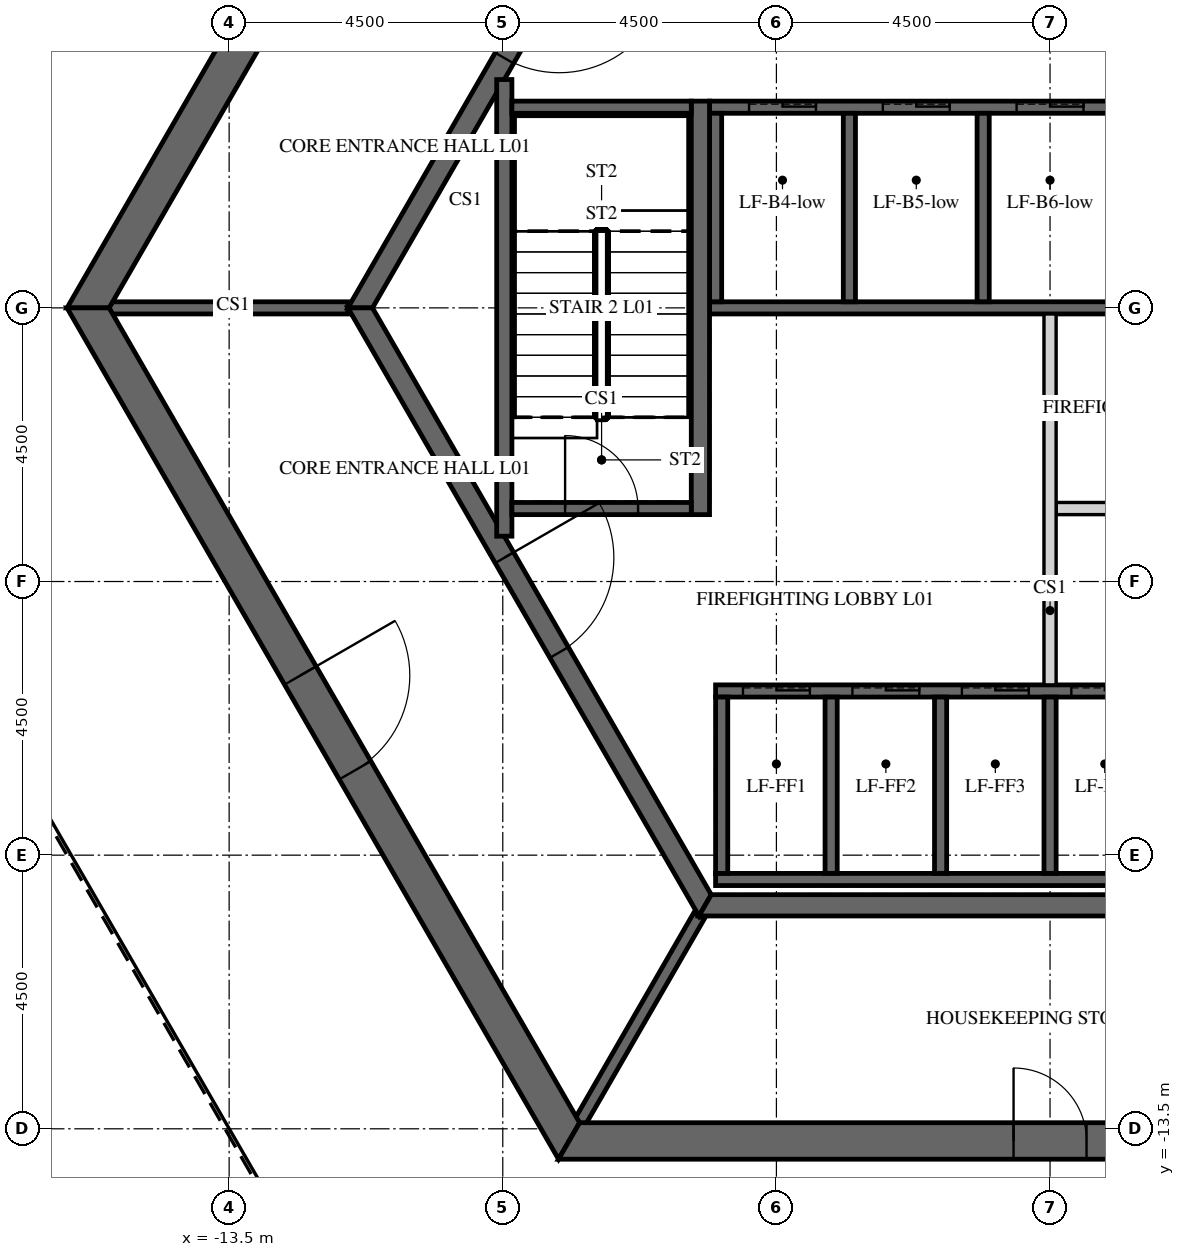
"""IFC4 building model, lengths in metres.
Left out: names, types, materials, properties, quantities, classifications, styles, units other than length and angle.
Written with IfcOpenShell. Run it as: python <this file> out.ifc"""

import sys

from ifc_helpers import new_model, si_unit, direction, frame, frame_2d, origin, place, context, subcontext, project, spatial, polyline, rectangle, outline, extrude, element, fill, save


model = new_model("IFC4")
c1 = context("Model", 3, precision=1e-05, world=origin(), true_north=direction((0.0, 1.0)))
c2 = subcontext(c1, "Body", "Model", "MODEL_VIEW")
j1 = project(units=[si_unit("LENGTHUNIT", "METRE"), si_unit("PLANEANGLEUNIT", "RADIAN")], contexts=[c1])
p1 = place(None, origin())
s1 = spatial("IfcSite", under=j1, at=p1, CompositionType="ELEMENT")
p2 = place(p1, origin())
s2 = spatial("IfcBuilding", under=s1, at=p2, CompositionType="ELEMENT")
p3 = place(p2, frame((0.0, 0.0, 9.0)))
s3 = spatial("IfcBuildingStorey", under=s2, at=p3, CompositionType="ELEMENT", Elevation=9.0)
p4 = place(p3, frame((-7.91, 13.7, -0.25), z_axis=(0.0, 0.0, 1.0), x_axis=(-0.499999880136, -0.866025472988, 0.0)))
e1 = element("IfcWall", 1, at=p4, inside=s3, PredefinedType="SHEAR", context=c2, shape_type="SweptSolid", body=[
    extrude(outline(polyline([(-0.173, -0.3), (15.993, -0.3), (15.646, 0.3), (0.173, 0.3), (-0.173, -0.3)])), origin(), (0.0, 0.0, 1.0), 6.0),
])
p5 = place(p4, frame((7.039, 0.0, 0.25)))
e2 = element("IfcOpeningElement", 2, at=p5, cuts=e1, PredefinedType="OPENING", context=c2, shape_type="SweptSolid", body=[
    extrude(rectangle(XDim=1.8, YDim=2.4, at=frame_2d((0.9, 1.2))), frame((0.0, 0.31, 0.0), z_axis=(0.0, -1.0, 0.0), x_axis=(1.0, 0.0, 0.0)), (0.0, 0.0, 1.0), 0.62),
])
p6 = place(p3, frame((-15.819, 0.0, -0.25), z_axis=(0.0, 0.0, 1.0), x_axis=(0.499999880136, -0.866025472988, 0.0)))
e3 = element("IfcWall", 3, at=p6, inside=s3, PredefinedType="SHEAR", context=c2, shape_type="SweptSolid", body=[
    extrude(outline(polyline([(-0.173, -0.3), (15.993, -0.3), (15.646, 0.3), (0.173, 0.3), (-0.173, -0.3)])), origin(), (0.0, 0.0, 1.0), 6.0),
])
p7 = place(p6, frame((6.981, 0.0, 0.25)))
e4 = element("IfcOpeningElement", 4, at=p7, cuts=e3, PredefinedType="OPENING", context=c2, shape_type="SweptSolid", body=[
    extrude(rectangle(XDim=1.8, YDim=2.4, at=frame_2d((0.9, 1.2))), frame((0.0, 0.31, 0.0), z_axis=(0.0, -1.0, 0.0), x_axis=(1.0, 0.0, 0.0)), (0.0, 0.0, 1.0), 0.62),
])
p8 = place(p3, frame((-7.91, -13.7, -0.25), z_axis=(0.0, 0.0, 1.0), x_axis=(1.0, 0.0, 0.0)))
e5 = element("IfcWall", 5, at=p8, inside=s3, PredefinedType="SHEAR", context=c2, shape_type="SweptSolid", body=[
    extrude(outline(polyline([(-0.173, -0.3), (15.993, -0.3), (15.646, 0.3), (0.173, 0.3), (-0.173, -0.3)])), origin(), (0.0, 0.0, 1.0), 6.0),
])
p9 = place(p8, frame((7.31, 0.0, 0.25)))
e6 = element("IfcOpeningElement", 6, at=p9, cuts=e5, PredefinedType="OPENING", context=c2, shape_type="SweptSolid", body=[
    extrude(rectangle(XDim=1.2, YDim=2.4, at=frame_2d((0.6, 1.2))), frame((0.0, 0.31, 0.0), z_axis=(0.0, -1.0, 0.0), x_axis=(1.0, 0.0, 0.0)), (0.0, 0.0, 1.0), 0.62),
])
p10 = place(p3, frame((-5.673, 9.825, -0.25), z_axis=(0.0, 0.0, 1.0), x_axis=(-0.499995046907, -0.866028263435, 0.0)))
e7 = element("IfcWall", 7, at=p10, inside=s3, PredefinedType="SHEAR", context=c2, shape_type="SweptSolid", body=[
    extrude(outline(polyline([(-0.101, -0.175), (11.446, -0.175), (11.244, 0.175), (0.101, 0.175), (-0.101, -0.175)])), origin(), (0.0, 0.0, 1.0), 6.0),
])
p11 = place(p10, frame((4.801, 0.0, 0.25)))
e8 = element("IfcOpeningElement", 8, at=p11, cuts=e7, PredefinedType="OPENING", context=c2, shape_type="SweptSolid", body=[
    extrude(rectangle(XDim=1.8, YDim=2.4, at=frame_2d((0.9, 1.2))), frame((0.0, 0.185, 0.0), z_axis=(0.0, -1.0, 0.0), x_axis=(1.0, 0.0, 0.0)), (0.0, 0.0, 1.0), 0.37),
])
p12 = place(p3, frame((-11.345, 0.0, -0.25), z_axis=(0.0, 0.0, 1.0), x_axis=(0.499995046907, -0.866028263435, 0.0)))
e9 = element("IfcWall", 9, at=p12, inside=s3, PredefinedType="SHEAR", context=c2, shape_type="SweptSolid", body=[
    extrude(outline(polyline([(-0.101, -0.175), (11.446, -0.175), (11.244, 0.175), (0.101, 0.175), (-0.101, -0.175)])), origin(), (0.0, 0.0, 1.0), 6.0),
])
p13 = place(p12, frame((4.744, 0.0, 0.25)))
e10 = element("IfcOpeningElement", 10, at=p13, cuts=e9, PredefinedType="OPENING", context=c2, shape_type="SweptSolid", body=[
    extrude(rectangle(XDim=1.8, YDim=2.4, at=frame_2d((0.9, 1.2))), frame((0.0, 0.185, 0.0), z_axis=(0.0, -1.0, 0.0), x_axis=(1.0, 0.0, 0.0)), (0.0, 0.0, 1.0), 0.37),
])
p14 = place(p3, frame((-5.673, -9.825, -0.25), z_axis=(0.0, 0.0, 1.0), x_axis=(1.0, 0.0, 0.0)))
e11 = element("IfcWall", 11, at=p14, inside=s3, PredefinedType="SHEAR", context=c2, shape_type="SweptSolid", body=[
    extrude(outline(polyline([(-0.101, -0.175), (11.446, -0.175), (11.244, 0.175), (0.101, 0.175), (-0.101, -0.175)])), origin(), (0.0, 0.0, 1.0), 6.0),
])
p15 = place(p3, frame((-5.6, 3.3, -0.25), z_axis=(0.0, 0.0, 1.0), x_axis=(1.0, 0.0, 0.0)))
e12 = element("IfcWall", 12, at=p15, inside=s3, PredefinedType="SHEAR", context=c2, shape_type="SweptSolid", body=[
    extrude(rectangle(XDim=11.2, YDim=0.2, at=frame_2d((5.6, 0.0))), origin(), (0.0, 0.0, 1.0), 6.0),
])
p16 = place(p15, frame((0.65, 0.0, 0.25)))
e13 = element("IfcOpeningElement", 13, at=p16, cuts=e12, PredefinedType="OPENING", context=c2, shape_type="SweptSolid", body=[
    extrude(rectangle(XDim=1.1, YDim=2.1, at=frame_2d((0.55, 1.05))), frame((0.0, 0.11, 0.0), z_axis=(0.0, -1.0, 0.0), x_axis=(1.0, 0.0, 0.0)), (0.0, 0.0, 1.0), 0.22),
])
p17 = place(p15, frame((2.85, 0.0, 0.25)))
e14 = element("IfcOpeningElement", 14, at=p17, cuts=e12, PredefinedType="OPENING", context=c2, shape_type="SweptSolid", body=[
    extrude(rectangle(XDim=1.1, YDim=2.1, at=frame_2d((0.55, 1.05))), frame((0.0, 0.11, 0.0), z_axis=(0.0, -1.0, 0.0), x_axis=(1.0, 0.0, 0.0)), (0.0, 0.0, 1.0), 0.22),
])
p18 = place(p15, frame((5.05, 0.0, 0.25)))
e15 = element("IfcOpeningElement", 15, at=p18, cuts=e12, PredefinedType="OPENING", context=c2, shape_type="SweptSolid", body=[
    extrude(rectangle(XDim=1.1, YDim=2.1, at=frame_2d((0.55, 1.05))), frame((0.0, 0.11, 0.0), z_axis=(0.0, -1.0, 0.0), x_axis=(1.0, 0.0, 0.0)), (0.0, 0.0, 1.0), 0.22),
])
p19 = place(p15, frame((7.25, 0.0, 0.25)))
e16 = element("IfcOpeningElement", 16, at=p19, cuts=e12, PredefinedType="OPENING", context=c2, shape_type="SweptSolid", body=[
    extrude(rectangle(XDim=1.1, YDim=2.1, at=frame_2d((0.55, 1.05))), frame((0.0, 0.11, 0.0), z_axis=(0.0, -1.0, 0.0), x_axis=(1.0, 0.0, 0.0)), (0.0, 0.0, 1.0), 0.22),
])
p20 = place(p15, frame((9.45, 0.0, 0.25)))
e17 = element("IfcOpeningElement", 17, at=p20, cuts=e12, PredefinedType="OPENING", context=c2, shape_type="SweptSolid", body=[
    extrude(rectangle(XDim=1.1, YDim=2.1, at=frame_2d((0.55, 1.05))), frame((0.0, 0.11, 0.0), z_axis=(0.0, -1.0, 0.0), x_axis=(1.0, 0.0, 0.0)), (0.0, 0.0, 1.0), 0.22),
])
p21 = place(p3, frame((-5.6, 0.0, -0.25), z_axis=(0.0, 0.0, 1.0), x_axis=(1.0, 0.0, 0.0)))
e18 = element("IfcWall", 18, at=p21, inside=s3, PredefinedType="SHEAR", context=c2, shape_type="SweptSolid", body=[
    extrude(rectangle(XDim=11.2, YDim=0.2, at=frame_2d((5.6, 0.0))), origin(), (0.0, 0.0, 1.0), 6.0),
])
for number, where, z_axis, x_axis in (
    (19, (-5.5, 0.1, -0.25), (0.0, 0.0, 1.0), (0.0, 1.0, 0.0)),
    (20, (-3.3, 0.1, -0.25), (0.0, 0.0, 1.0), (0.0, 1.0, 0.0)),
    (21, (-1.1, 0.1, -0.25), (0.0, 0.0, 1.0), (0.0, 1.0, 0.0)),
):
    element("IfcWall", number, at=place(p3, frame(where, z_axis=z_axis, x_axis=x_axis)), inside=s3, PredefinedType="SHEAR", context=c2, shape_type="SweptSolid", body=[
        extrude(rectangle(XDim=3.1, YDim=0.2, at=frame_2d((1.55, 0.0))), origin(), (0.0, 0.0, 1.0), 6.0),
    ])
p22 = place(p3, frame((-5.5, -6.3, -0.25), z_axis=(0.0, 0.0, 1.0), x_axis=(1.0, 0.0, 0.0)))
e22 = element("IfcWall", 22, at=p22, inside=s3, PredefinedType="SHEAR", context=c2, shape_type="SweptSolid", body=[
    extrude(rectangle(XDim=9.2, YDim=0.2, at=frame_2d((4.6, 0.0))), origin(), (0.0, 0.0, 1.0), 6.0),
])
p23 = place(p22, frame((0.45, 0.0, 0.25)))
e23 = element("IfcOpeningElement", 23, at=p23, cuts=e22, PredefinedType="OPENING", context=c2, shape_type="SweptSolid", body=[
    extrude(rectangle(XDim=1.1, YDim=2.1, at=frame_2d((0.55, 1.05))), frame((0.0, 0.11, 0.0), z_axis=(0.0, -1.0, 0.0), x_axis=(1.0, 0.0, 0.0)), (0.0, 0.0, 1.0), 0.22),
])
p24 = place(p22, frame((2.25, 0.0, 0.25)))
e24 = element("IfcOpeningElement", 24, at=p24, cuts=e22, PredefinedType="OPENING", context=c2, shape_type="SweptSolid", body=[
    extrude(rectangle(XDim=1.1, YDim=2.1, at=frame_2d((0.55, 1.05))), frame((0.0, 0.11, 0.0), z_axis=(0.0, -1.0, 0.0), x_axis=(1.0, 0.0, 0.0)), (0.0, 0.0, 1.0), 0.22),
])
p25 = place(p22, frame((4.05, 0.0, 0.25)))
e25 = element("IfcOpeningElement", 25, at=p25, cuts=e22, PredefinedType="OPENING", context=c2, shape_type="SweptSolid", body=[
    extrude(rectangle(XDim=1.1, YDim=2.1, at=frame_2d((0.55, 1.05))), frame((0.0, 0.11, 0.0), z_axis=(0.0, -1.0, 0.0), x_axis=(1.0, 0.0, 0.0)), (0.0, 0.0, 1.0), 0.22),
])
p26 = place(p22, frame((5.85, 0.0, 0.25)))
e26 = element("IfcOpeningElement", 26, at=p26, cuts=e22, PredefinedType="OPENING", context=c2, shape_type="SweptSolid", body=[
    extrude(rectangle(XDim=1.1, YDim=2.1, at=frame_2d((0.55, 1.05))), frame((0.0, 0.11, 0.0), z_axis=(0.0, -1.0, 0.0), x_axis=(1.0, 0.0, 0.0)), (0.0, 0.0, 1.0), 0.22),
])
p27 = place(p22, frame((7.65, 0.0, 0.25)))
e27 = element("IfcOpeningElement", 27, at=p27, cuts=e22, PredefinedType="OPENING", context=c2, shape_type="SweptSolid", body=[
    extrude(rectangle(XDim=1.1, YDim=2.1, at=frame_2d((0.55, 1.05))), frame((0.0, 0.11, 0.0), z_axis=(0.0, -1.0, 0.0), x_axis=(1.0, 0.0, 0.0)), (0.0, 0.0, 1.0), 0.22),
])
p28 = place(p3, frame((-5.5, -9.4, -0.25), z_axis=(0.0, 0.0, 1.0), x_axis=(1.0, 0.0, 0.0)))
e28 = element("IfcWall", 28, at=p28, inside=s3, PredefinedType="SHEAR", context=c2, shape_type="SweptSolid", body=[
    extrude(rectangle(XDim=9.2, YDim=0.2, at=frame_2d((4.6, 0.0))), origin(), (0.0, 0.0, 1.0), 6.0),
])
for number, where, z_axis, x_axis in (
    (29, (-5.4, -9.3, -0.25), (0.0, 0.0, 1.0), (0.0, 1.0, 0.0)),
    (30, (-3.6, -9.3, -0.25), (0.0, 0.0, 1.0), (0.0, 1.0, 0.0)),
    (31, (-1.8, -9.3, -0.25), (0.0, 0.0, 1.0), (0.0, 1.0, 0.0)),
    (32, (0.0, -9.3, -0.25), (0.0, 0.0, 1.0), (0.0, 1.0, 0.0)),
):
    element("IfcWall", number, at=place(p3, frame(where, z_axis=z_axis, x_axis=x_axis)), inside=s3, PredefinedType="SHEAR", context=c2, shape_type="SweptSolid", body=[
        extrude(rectangle(XDim=2.9, YDim=0.2, at=frame_2d((1.45, 0.0))), origin(), (0.0, 0.0, 1.0), 6.0),
    ])
p29 = place(p3, frame((0.1, -3.3, 0.0), z_axis=(0.0, 0.0, 1.0), x_axis=(1.0, 0.0, 0.0)))
e33 = element("IfcWall", 33, at=p29, inside=s3, PredefinedType="PARTITIONING", context=c2, shape_type="SweptSolid", body=[
    extrude(rectangle(XDim=5.5, YDim=0.2, at=frame_2d((2.75, 0.0))), origin(), (0.0, 0.0, 1.0), 5.75),
])
p30 = place(p29, frame((2.3, 0.0, 0.0)))
e34 = element("IfcOpeningElement", 34, at=p30, cuts=e33, PredefinedType="OPENING", context=c2, shape_type="SweptSolid", body=[
    extrude(rectangle(XDim=0.9, YDim=2.1, at=frame_2d((0.45, 1.05))), frame((0.0, 0.11, 0.0), z_axis=(0.0, -1.0, 0.0), x_axis=(1.0, 0.0, 0.0)), (0.0, 0.0, 1.0), 0.22),
])
p31 = place(p3, frame((0.0, -6.2, 0.0), z_axis=(0.0, 0.0, 1.0), x_axis=(0.0, 1.0, 0.0)))
e35 = element("IfcWall", 35, at=p31, inside=s3, PredefinedType="PARTITIONING", context=c2, shape_type="SweptSolid", body=[
    extrude(rectangle(XDim=6.1, YDim=0.2, at=frame_2d((3.05, 0.0))), origin(), (0.0, 0.0, 1.0), 5.75),
])
p32 = place(p3, frame((-11.547, 0.0, -0.25), z_axis=(0.0, 0.0, 1.0), x_axis=(-1.0, 0.0, 0.0)))
e36 = element("IfcWall", 36, at=p32, inside=s3, PredefinedType="SHEAR", context=c2, shape_type="SweptSolid", body=[
    extrude(rectangle(XDim=3.926, YDim=0.2, at=frame_2d((1.963, 0.0))), origin(), (0.0, 0.0, 1.0), 6.0),
])
p33 = place(p3, frame((-5.773, -10.0, -0.25), z_axis=(0.0, 0.0, 1.0), x_axis=(-0.500038251005, -0.86600331843, 0.0)))
e37 = element("IfcWall", 37, at=p33, inside=s3, PredefinedType="SHEAR", context=c2, shape_type="SweptSolid", body=[
    extrude(rectangle(XDim=3.926, YDim=0.2, at=frame_2d((1.963, 0.0))), origin(), (0.0, 0.0, 1.0), 6.0),
])
p34 = place(p3, frame((-5.75, -3.4, -0.25), z_axis=(0.0, 0.0, 1.0), x_axis=(0.0, 1.0, 0.0)))
e38 = element("IfcWall", 38, at=p34, inside=s3, PredefinedType="SHEAR", context=c2, shape_type="SweptSolid", body=[
    extrude(rectangle(XDim=6.8, YDim=0.3, at=frame_2d((3.4, 0.0))), origin(), (0.0, 0.0, 1.0), 6.0),
])
p35 = place(p3, frame((-8.975, -3.755, -0.25), z_axis=(0.0, 0.0, 1.0), x_axis=(0.0, 1.0, 0.0)))
e39 = element("IfcWall", 39, at=p35, inside=s3, PredefinedType="SHEAR", context=c2, shape_type="SweptSolid", body=[
    extrude(rectangle(XDim=7.51, YDim=0.25, at=frame_2d((3.755, 0.0))), origin(), (0.0, 0.0, 1.0), 6.0),
])
p36 = place(p3, frame((-8.85, 3.3, -0.25), z_axis=(0.0, 0.0, 1.0), x_axis=(1.0, 0.0, 0.0)))
e40 = element("IfcWall", 40, at=p36, inside=s3, PredefinedType="SHEAR", context=c2, shape_type="SweptSolid", body=[
    extrude(rectangle(XDim=2.95, YDim=0.2, at=frame_2d((1.475, 0.0))), origin(), (0.0, 0.0, 1.0), 6.0),
])
p37 = place(p3, frame((-8.85, -3.3, -0.25), z_axis=(0.0, 0.0, 1.0), x_axis=(1.0, 0.0, 0.0)))
e41 = element("IfcWall", 41, at=p37, inside=s3, PredefinedType="SHEAR", context=c2, shape_type="SweptSolid", body=[
    extrude(rectangle(XDim=2.95, YDim=0.2, at=frame_2d((1.475, 0.0))), origin(), (0.0, 0.0, 1.0), 6.0),
])
p38 = place(p37, frame((0.875, 0.0, 0.25)))
e42 = element("IfcOpeningElement", 42, at=p38, cuts=e41, PredefinedType="OPENING", context=c2, shape_type="SweptSolid", body=[
    extrude(rectangle(XDim=1.2, YDim=2.4, at=frame_2d((0.6, 1.2))), frame((0.0, 0.11, 0.0), z_axis=(0.0, -1.0, 0.0), x_axis=(1.0, 0.0, 0.0)), (0.0, 0.0, 1.0), 0.22),
])
p39 = place(p7, origin())
e43 = element("IfcDoor", 43, at=p39, inside=s3, OperationType="DOUBLE_DOOR_SINGLE_SWING", PredefinedType="DOOR", context=c2, shape_type="SweptSolid", body=[
    extrude(rectangle(XDim=1.8, YDim=2.4, at=frame_2d((0.9, 1.2))), frame((0.0, 0.025, 0.0), z_axis=(0.0, -1.0, 0.0), x_axis=(1.0, 0.0, 0.0)), (0.0, 0.0, 1.0), 0.05),
])
fill(e4, e43)
p40 = place(p9, origin())
e44 = element("IfcDoor", 44, at=p40, inside=s3, OperationType="SINGLE_SWING_LEFT", PredefinedType="DOOR", context=c2, shape_type="SweptSolid", body=[
    extrude(rectangle(XDim=1.2, YDim=2.4, at=frame_2d((0.6, 1.2))), frame((0.0, 0.025, 0.0), z_axis=(0.0, -1.0, 0.0), x_axis=(1.0, 0.0, 0.0)), (0.0, 0.0, 1.0), 0.05),
])
fill(e6, e44)
p41 = place(p11, origin())
e45 = element("IfcDoor", 45, at=p41, inside=s3, OperationType="DOUBLE_DOOR_SINGLE_SWING", PredefinedType="DOOR", context=c2, shape_type="SweptSolid", body=[
    extrude(rectangle(XDim=1.8, YDim=2.4, at=frame_2d((0.9, 1.2))), frame((0.0, 0.025, 0.0), z_axis=(0.0, -1.0, 0.0), x_axis=(1.0, 0.0, 0.0)), (0.0, 0.0, 1.0), 0.05),
])
fill(e8, e45)
p42 = place(p13, origin())
e46 = element("IfcDoor", 46, at=p42, inside=s3, OperationType="DOUBLE_DOOR_SINGLE_SWING", PredefinedType="DOOR", context=c2, shape_type="SweptSolid", body=[
    extrude(rectangle(XDim=1.8, YDim=2.4, at=frame_2d((0.9, 1.2))), frame((0.0, 0.025, 0.0), z_axis=(0.0, -1.0, 0.0), x_axis=(1.0, 0.0, 0.0)), (0.0, 0.0, 1.0), 0.05),
])
fill(e10, e46)
p43 = place(p38, origin())
e47 = element("IfcDoor", 47, at=p43, inside=s3, OperationType="SINGLE_SWING_LEFT", PredefinedType="DOOR", context=c2, shape_type="SweptSolid", body=[
    extrude(rectangle(XDim=1.2, YDim=2.4, at=frame_2d((0.6, 1.2))), frame((0.0, 0.025, 0.0), z_axis=(0.0, -1.0, 0.0), x_axis=(1.0, 0.0, 0.0)), (0.0, 0.0, 1.0), 0.05),
])
fill(e42, e47)
p44 = place(p16, origin())
e48 = element("IfcDoor", 48, at=p44, inside=s3, OperationType="SLIDING_TO_LEFT", PredefinedType="DOOR", context=c2, shape_type="SweptSolid", body=[
    extrude(rectangle(XDim=1.1, YDim=2.1, at=frame_2d((0.55, 1.05))), frame((0.0, 0.025, 0.0), z_axis=(0.0, -1.0, 0.0), x_axis=(1.0, 0.0, 0.0)), (0.0, 0.0, 1.0), 0.05),
])
fill(e13, e48)
p45 = place(p17, origin())
e49 = element("IfcDoor", 49, at=p45, inside=s3, OperationType="SLIDING_TO_LEFT", PredefinedType="DOOR", context=c2, shape_type="SweptSolid", body=[
    extrude(rectangle(XDim=1.1, YDim=2.1, at=frame_2d((0.55, 1.05))), frame((0.0, 0.025, 0.0), z_axis=(0.0, -1.0, 0.0), x_axis=(1.0, 0.0, 0.0)), (0.0, 0.0, 1.0), 0.05),
])
fill(e14, e49)
p46 = place(p18, origin())
e50 = element("IfcDoor", 50, at=p46, inside=s3, OperationType="SLIDING_TO_LEFT", PredefinedType="DOOR", context=c2, shape_type="SweptSolid", body=[
    extrude(rectangle(XDim=1.1, YDim=2.1, at=frame_2d((0.55, 1.05))), frame((0.0, 0.025, 0.0), z_axis=(0.0, -1.0, 0.0), x_axis=(1.0, 0.0, 0.0)), (0.0, 0.0, 1.0), 0.05),
])
fill(e15, e50)
p47 = place(p23, origin())
e51 = element("IfcDoor", 51, at=p47, inside=s3, OperationType="SLIDING_TO_LEFT", PredefinedType="DOOR", context=c2, shape_type="SweptSolid", body=[
    extrude(rectangle(XDim=1.1, YDim=2.1, at=frame_2d((0.55, 1.05))), frame((0.0, 0.025, 0.0), z_axis=(0.0, -1.0, 0.0), x_axis=(1.0, 0.0, 0.0)), (0.0, 0.0, 1.0), 0.05),
])
fill(e23, e51)
p48 = place(p24, origin())
e52 = element("IfcDoor", 52, at=p48, inside=s3, OperationType="SLIDING_TO_LEFT", PredefinedType="DOOR", context=c2, shape_type="SweptSolid", body=[
    extrude(rectangle(XDim=1.1, YDim=2.1, at=frame_2d((0.55, 1.05))), frame((0.0, 0.025, 0.0), z_axis=(0.0, -1.0, 0.0), x_axis=(1.0, 0.0, 0.0)), (0.0, 0.0, 1.0), 0.05),
])
fill(e24, e52)
p49 = place(p25, origin())
e53 = element("IfcDoor", 53, at=p49, inside=s3, OperationType="SLIDING_TO_LEFT", PredefinedType="DOOR", context=c2, shape_type="SweptSolid", body=[
    extrude(rectangle(XDim=1.1, YDim=2.1, at=frame_2d((0.55, 1.05))), frame((0.0, 0.025, 0.0), z_axis=(0.0, -1.0, 0.0), x_axis=(1.0, 0.0, 0.0)), (0.0, 0.0, 1.0), 0.05),
])
fill(e25, e53)
p50 = place(p26, origin())
e54 = element("IfcDoor", 54, at=p50, inside=s3, OperationType="SLIDING_TO_LEFT", PredefinedType="DOOR", context=c2, shape_type="SweptSolid", body=[
    extrude(rectangle(XDim=1.1, YDim=2.1, at=frame_2d((0.55, 1.05))), frame((0.0, 0.025, 0.0), z_axis=(0.0, -1.0, 0.0), x_axis=(1.0, 0.0, 0.0)), (0.0, 0.0, 1.0), 0.05),
])
fill(e26, e54)
save(model, sys.argv[1])
